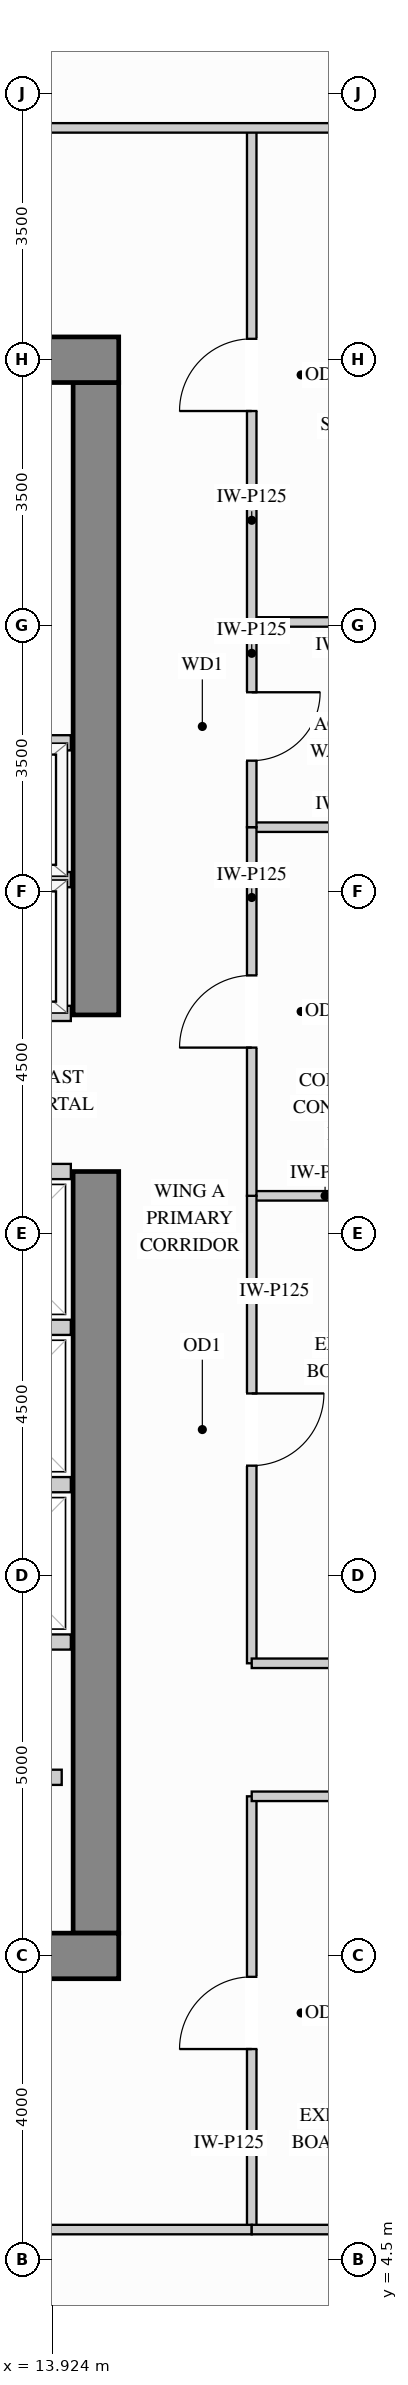
"""IFC4 building model, lengths in metres.
Left out: names, types, materials, properties, quantities, classifications, styles, units other than length and angle.
Written with IfcOpenShell. Run it as: python <this file> out.ifc"""

import sys

from ifc_helpers import new_model, si_unit, direction, frame, frame_2d, origin, place, context, subcontext, project, spatial, rectangle, extrude, source, transform, mapped, element, fill, save


model = new_model("IFC4")
c1 = context("Model", 3, precision=1e-05, world=origin(), true_north=direction((0.0, 1.0)))
c2 = subcontext(c1, "Body", "Model", "MODEL_VIEW")
j1 = project(units=[si_unit("LENGTHUNIT", "METRE"), si_unit("PLANEANGLEUNIT", "RADIAN")], contexts=[c1])
p1 = place(None, origin())
s1 = spatial("IfcSite", under=j1, at=p1, CompositionType="ELEMENT")
p2 = place(p1, origin())
s2 = spatial("IfcBuilding", under=s1, at=p2, CompositionType="ELEMENT")
p3 = place(p2, frame((0.0, 0.0, 179.1)))
s3 = spatial("IfcBuildingStorey", under=s2, at=p3, CompositionType="ELEMENT", Elevation=179.1)
m1 = source(origin(), c2, "Body", "SweptSolid", [
    extrude(rectangle(XDim=10.02, YDim=0.6, at=frame_2d((5.01, 0.0))), origin(), (0.0, 0.0, 1.0), 3.4),
])
p4 = place(p3, frame((14.5, 8.8, 0.0), z_axis=(0.0, 0.0, 1.0), x_axis=(0.0, 1.0, 0.0)))
e1 = element("IfcWall", 1, at=p4, inside=s3, PredefinedType="SHEAR", context=c2, shape_type="MappedRepresentation", body=[
    mapped(m1, transform((0.0, 0.0, 0.0), x_axis=(1.0, 0.0, 0.0), y_axis=(0.0, 1.0, 0.0), z_axis=(0.0, 0.0, 1.0))),
])
m2 = source(origin(), c2, "Body", "SweptSolid", [
    extrude(rectangle(XDim=8.32, YDim=0.6, at=frame_2d((4.16, 0.0))), origin(), (0.0, 0.0, 1.0), 3.4),
])
p5 = place(p3, frame((14.5, 20.88, 0.0), z_axis=(0.0, 0.0, 1.0), x_axis=(0.0, 1.0, 0.0)))
e2 = element("IfcWall", 2, at=p5, inside=s3, PredefinedType="SHEAR", context=c2, shape_type="MappedRepresentation", body=[
    mapped(m2, transform((0.0, 0.0, 0.0), x_axis=(1.0, 0.0, 0.0), y_axis=(0.0, 1.0, 0.0), z_axis=(0.0, 0.0, 1.0))),
])
m3 = source(origin(), c2, "Body", "SweptSolid", [
    extrude(rectangle(XDim=10.6, YDim=0.6, at=frame_2d((5.3, 0.0))), origin(), (0.0, 0.0, 1.0), 3.4),
])
for number, where, z_axis, x_axis in (
    (3, (4.2, 29.5, 0.0), (0.0, 0.0, 1.0), (1.0, 0.0, 0.0)),
    (4, (4.2, 8.5, 0.0), (0.0, 0.0, 1.0), (1.0, 0.0, 0.0)),
):
    element("IfcWall", number, at=place(p3, frame(where, z_axis=z_axis, x_axis=x_axis)), inside=s3, PredefinedType="SHEAR", context=c2, shape_type="MappedRepresentation", body=[
        mapped(m3, transform((0.0, 0.0, 0.0), x_axis=(1.0, 0.0, 0.0), y_axis=(0.0, 1.0, 0.0), z_axis=(0.0, 0.0, 1.0))),
    ])
m4 = source(origin(), c2, "Body", "SweptSolid", [
    extrude(rectangle(XDim=1.93, YDim=0.125, at=frame_2d((0.965, 0.0))), origin(), (0.0, 0.0, 1.0), 3.385),
])
p6 = place(p3, frame((16.55, 18.5, 0.0), z_axis=(0.0, 0.0, 1.0), x_axis=(1.0, 0.0, 0.0)))
e5 = element("IfcWall", 5, at=p6, inside=s3, PredefinedType="PARTITIONING", context=c2, shape_type="MappedRepresentation", body=[
    mapped(m4, transform((0.0, 0.0, 0.0), x_axis=(1.0, 0.0, 0.0), y_axis=(0.0, 1.0, 0.0), z_axis=(0.0, 0.0, 1.0))),
])
m5 = source(origin(), c2, "Body", "SweptSolid", [
    extrude(rectangle(XDim=2.598, YDim=0.125, at=frame_2d((1.299, 0.0))), origin(), (0.0, 0.0, 1.0), 3.385),
])
for number, where, z_axis, x_axis in (
    (6, (16.55, 23.35, 0.0), (0.0, 0.0, 1.0), (1.0, 0.0, 0.0)),
    (7, (16.55, 26.05, 0.0), (0.0, 0.0, 1.0), (1.0, 0.0, 0.0)),
):
    element("IfcWall", number, at=place(p3, frame(where, z_axis=z_axis, x_axis=x_axis)), inside=s3, PredefinedType="PARTITIONING", context=c2, shape_type="MappedRepresentation", body=[
        mapped(m5, transform((0.0, 0.0, 0.0), x_axis=(1.0, 0.0, 0.0), y_axis=(0.0, 1.0, 0.0), z_axis=(0.0, 0.0, 1.0))),
    ])
p7 = place(p3, frame((16.55, 12.35, 0.0), z_axis=(0.0, 0.0, 1.0), x_axis=(0.0, 1.0, 0.0)))
e8 = element("IfcWall", 8, at=p7, inside=s3, PredefinedType="PARTITIONING", context=c2, shape_type="SweptSolid", body=[
    extrude(rectangle(XDim=6.15, YDim=0.125, at=frame_2d((3.075, 0.0))), origin(), (0.0, 0.0, 1.0), 3.385),
])
p8 = place(p7, frame((2.6, 0.0, 0.0)))
e9 = element("IfcOpeningElement", 9, at=p8, cuts=e8, PredefinedType="OPENING", context=c2, shape_type="SweptSolid", body=[
    extrude(rectangle(XDim=0.95, YDim=2.15, at=frame_2d((0.475, 1.075))), frame((0.0, 0.073, 0.0), z_axis=(0.0, -1.0, 0.0), x_axis=(1.0, 0.0, 0.0)), (0.0, 0.0, 1.0), 0.145),
])
p9 = place(p3, frame((16.55, 18.5, 0.0), z_axis=(0.0, 0.0, 1.0), x_axis=(0.0, 1.0, 0.0)))
e10 = element("IfcWall", 10, at=p9, inside=s3, PredefinedType="PARTITIONING", context=c2, shape_type="SweptSolid", body=[
    extrude(rectangle(XDim=4.85, YDim=0.125, at=frame_2d((2.425, 0.0))), origin(), (0.0, 0.0, 1.0), 3.385),
])
p10 = place(p9, frame((1.95, 0.0, 0.0)))
e11 = element("IfcOpeningElement", 11, at=p10, cuts=e10, PredefinedType="OPENING", context=c2, shape_type="SweptSolid", body=[
    extrude(rectangle(XDim=0.95, YDim=2.15, at=frame_2d((0.475, 1.075))), frame((0.0, 0.073, 0.0), z_axis=(0.0, -1.0, 0.0), x_axis=(1.0, 0.0, 0.0)), (0.0, 0.0, 1.0), 0.145),
])
p11 = place(p3, frame((16.55, 26.05, 0.0), z_axis=(0.0, 0.0, 1.0), x_axis=(0.0, 1.0, 0.0)))
e12 = element("IfcWall", 12, at=p11, inside=s3, PredefinedType="PARTITIONING", context=c2, shape_type="SweptSolid", body=[
    extrude(rectangle(XDim=6.5, YDim=0.125, at=frame_2d((3.25, 0.0))), origin(), (0.0, 0.0, 1.0), 3.385),
])
p12 = place(p11, frame((2.775, 0.0, 0.0)))
e13 = element("IfcOpeningElement", 13, at=p12, cuts=e12, PredefinedType="OPENING", context=c2, shape_type="SweptSolid", body=[
    extrude(rectangle(XDim=0.95, YDim=2.15, at=frame_2d((0.475, 1.075))), frame((0.0, 0.073, 0.0), z_axis=(0.0, -1.0, 0.0), x_axis=(1.0, 0.0, 0.0)), (0.0, 0.0, 1.0), 0.145),
])
p13 = place(p3, frame((16.55, 4.9, 0.0), z_axis=(0.0, 0.0, 1.0), x_axis=(0.0, 1.0, 0.0)))
e14 = element("IfcWall", 14, at=p13, inside=s3, PredefinedType="PARTITIONING", context=c2, shape_type="SweptSolid", body=[
    extrude(rectangle(XDim=5.7, YDim=0.125, at=frame_2d((2.85, 0.0))), origin(), (0.0, 0.0, 1.0), 3.385),
])
p14 = place(p13, frame((2.375, 0.0, 0.0)))
e15 = element("IfcOpeningElement", 15, at=p14, cuts=e14, PredefinedType="OPENING", context=c2, shape_type="SweptSolid", body=[
    extrude(rectangle(XDim=0.95, YDim=2.15, at=frame_2d((0.475, 1.075))), frame((0.0, 0.073, 0.0), z_axis=(0.0, -1.0, 0.0), x_axis=(1.0, 0.0, 0.0)), (0.0, 0.0, 1.0), 0.145),
])
p15 = place(p3, frame((16.55, 23.35, 0.0), z_axis=(0.0, 0.0, 1.0), x_axis=(0.0, 1.0, 0.0)))
e16 = element("IfcWall", 16, at=p15, inside=s3, PredefinedType="PARTITIONING", context=c2, shape_type="SweptSolid", body=[
    extrude(rectangle(XDim=2.7, YDim=0.125, at=frame_2d((1.35, 0.0))), origin(), (0.0, 0.0, 1.0), 3.385),
])
p16 = place(p15, frame((0.875, 0.0, 0.0)))
e17 = element("IfcOpeningElement", 17, at=p16, cuts=e16, PredefinedType="OPENING", context=c2, shape_type="SweptSolid", body=[
    extrude(rectangle(XDim=0.9, YDim=2.15, at=frame_2d((0.45, 1.075))), frame((0.0, 0.073, 0.0), z_axis=(0.0, -1.0, 0.0), x_axis=(1.0, 0.0, 0.0)), (0.0, 0.0, 1.0), 0.145),
])
m6 = source(origin(), c2, "Body", "SweptSolid", [
    extrude(rectangle(XDim=7.498, YDim=0.125, at=frame_2d((3.749, 0.0))), origin(), (0.0, 0.0, 1.0), 3.385),
])
p17 = place(p3, frame((11.65, 32.55, 0.0), z_axis=(0.0, 0.0, 1.0), x_axis=(1.0, 0.0, 0.0)))
e18 = element("IfcWall", 18, at=p17, inside=s3, PredefinedType="PARTITIONING", context=c2, shape_type="MappedRepresentation", body=[
    mapped(m6, transform((0.0, 0.0, 0.0), x_axis=(1.0, 0.0, 0.0), y_axis=(0.0, 1.0, 0.0), z_axis=(0.0, 0.0, 1.0))),
])
m7 = source(origin(), c2, "Body", "SweptSolid", [
    extrude(rectangle(XDim=2.95, YDim=0.125, at=frame_2d((1.475, 0.0))), origin(), (0.0, 0.0, 1.0), 3.385),
])
for number, where, z_axis, x_axis in (
    (19, (16.55, 12.35, 0.0), (0.0, 0.0, 1.0), (1.0, 0.0, 0.0)),
    (20, (16.55, 10.6, 0.0), (0.0, 0.0, 1.0), (1.0, 0.0, 0.0)),
):
    element("IfcWall", number, at=place(p3, frame(where, z_axis=z_axis, x_axis=x_axis)), inside=s3, PredefinedType="PARTITIONING", context=c2, shape_type="MappedRepresentation", body=[
        mapped(m7, transform((0.0, 0.0, 0.0), x_axis=(1.0, 0.0, 0.0), y_axis=(0.0, 1.0, 0.0), z_axis=(0.0, 0.0, 1.0))),
    ])
p18 = place(p3, frame((10.213, 4.9, 0.0), z_axis=(0.0, 0.0, 1.0), x_axis=(1.0, 0.0, 0.0)))
e21 = element("IfcWall", 21, at=p18, inside=s3, PredefinedType="PARTITIONING", context=c2, shape_type="SweptSolid", body=[
    extrude(rectangle(XDim=6.337, YDim=0.125, at=frame_2d((3.168, 0.0))), origin(), (0.0, 0.0, 1.0), 2.848),
])
p19 = place(p18, frame((2.694, 0.0, 0.0)))
e22 = element("IfcOpeningElement", 22, at=p19, cuts=e21, PredefinedType="OPENING", context=c2, shape_type="SweptSolid", body=[
    extrude(rectangle(XDim=0.95, YDim=2.15, at=frame_2d((0.475, 1.075))), frame((0.0, 0.073, 0.0), z_axis=(0.0, -1.0, 0.0), x_axis=(1.0, 0.0, 0.0)), (0.0, 0.0, 1.0), 0.145),
])
m8 = source(origin(), c2, "Body", "SweptSolid", [
    extrude(rectangle(XDim=2.598, YDim=0.125, at=frame_2d((1.299, 0.0))), origin(), (0.0, 0.0, 1.0), 2.848),
])
p20 = place(p3, frame((16.55, 4.9, 0.0), z_axis=(0.0, 0.0, 1.0), x_axis=(1.0, 0.0, 0.0)))
e23 = element("IfcWall", 23, at=p20, inside=s3, PredefinedType="PARTITIONING", context=c2, shape_type="MappedRepresentation", body=[
    mapped(m8, transform((0.0, 0.0, 0.0), x_axis=(1.0, 0.0, 0.0), y_axis=(0.0, 1.0, 0.0), z_axis=(0.0, 0.0, 1.0))),
])
m9 = source(origin(), c2, "Body", "SweptSolid", [
    extrude(rectangle(XDim=1.63, YDim=0.2, at=frame_2d((0.815, 0.0))), origin(), (0.0, 0.0, 1.0), 3.385),
])
p21 = place(p3, frame((12.42, 10.85, 0.0), z_axis=(0.0, 0.0, 1.0), x_axis=(1.0, 0.0, 0.0)))
e24 = element("IfcWall", 24, at=p21, inside=s3, PredefinedType="PARTITIONING", context=c2, shape_type="MappedRepresentation", body=[
    mapped(m9, transform((0.0, 0.0, 0.0), x_axis=(1.0, 0.0, 0.0), y_axis=(0.0, 1.0, 0.0), z_axis=(0.0, 0.0, 1.0))),
])
m10 = source(origin(), c2, "Body", "SweptSolid", [
    extrude(rectangle(XDim=2.34, YDim=0.2, at=frame_2d((1.17, 0.0))), origin(), (0.0, 0.0, 1.0), 3.385),
])
for number, where, z_axis, x_axis in (
    (25, (11.83, 22.66, 0.0), (0.0, 0.0, 1.0), (1.0, 0.0, 0.0)),
    (26, (11.83, 20.9, 0.0), (0.0, 0.0, 1.0), (1.0, 0.0, 0.0)),
    (27, (11.83, 24.46, 0.0), (0.0, 0.0, 1.0), (1.0, 0.0, 0.0)),
):
    element("IfcWall", number, at=place(p3, frame(where, z_axis=z_axis, x_axis=x_axis)), inside=s3, PredefinedType="PARTITIONING", context=c2, shape_type="MappedRepresentation", body=[
        mapped(m10, transform((0.0, 0.0, 0.0), x_axis=(1.0, 0.0, 0.0), y_axis=(0.0, 1.0, 0.0), z_axis=(0.0, 0.0, 1.0))),
    ])
m11 = source(origin(), c2, "Body", "SweptSolid", [
    extrude(rectangle(XDim=1.94, YDim=0.2, at=frame_2d((0.97, 0.0))), origin(), (0.0, 0.0, 1.0), 3.385),
])
for number, where, z_axis, x_axis in (
    (28, (12.23, 14.7, 0.0), (0.0, 0.0, 1.0), (1.0, 0.0, 0.0)),
    (29, (12.23, 12.63, 0.0), (0.0, 0.0, 1.0), (1.0, 0.0, 0.0)),
    (30, (12.23, 16.77, 0.0), (0.0, 0.0, 1.0), (1.0, 0.0, 0.0)),
    (31, (12.23, 18.82, 0.0), (0.0, 0.0, 1.0), (1.0, 0.0, 0.0)),
):
    element("IfcWall", number, at=place(p3, frame(where, z_axis=z_axis, x_axis=x_axis)), inside=s3, PredefinedType="PARTITIONING", context=c2, shape_type="MappedRepresentation", body=[
        mapped(m11, transform((0.0, 0.0, 0.0), x_axis=(1.0, 0.0, 0.0), y_axis=(0.0, 1.0, 0.0), z_axis=(0.0, 0.0, 1.0))),
    ])
m12 = source(origin(), c2, "Body", "SweptSolid", [
    extrude(rectangle(XDim=0.95, YDim=2.15, at=frame_2d((0.475, 1.075))), frame((0.0, 0.025, 0.0), z_axis=(0.0, -1.0, 0.0), x_axis=(1.0, 0.0, 0.0)), (0.0, 0.0, 1.0), 0.05),
])
p22 = place(p14, origin())
e32 = element("IfcDoor", 32, at=p22, inside=s3, OperationType="SINGLE_SWING_LEFT", PredefinedType="DOOR", context=c2, shape_type="MappedRepresentation", body=[
    mapped(m12, transform((0.0, 0.0, 0.0), x_axis=(1.0, 0.0, 0.0), y_axis=(0.0, 1.0, 0.0), z_axis=(0.0, 0.0, 1.0))),
])
fill(e15, e32)
p23 = place(p8, origin())
e33 = element("IfcDoor", 33, at=p23, inside=s3, OperationType="SINGLE_SWING_RIGHT", PredefinedType="DOOR", context=c2, shape_type="MappedRepresentation", body=[
    mapped(m12, transform((0.0, 0.0, 0.0), x_axis=(1.0, 0.0, 0.0), y_axis=(0.0, 1.0, 0.0), z_axis=(0.0, 0.0, 1.0))),
])
fill(e9, e33)
p24 = place(p10, origin())
e34 = element("IfcDoor", 34, at=p24, inside=s3, OperationType="SINGLE_SWING_LEFT", PredefinedType="DOOR", context=c2, shape_type="MappedRepresentation", body=[
    mapped(m12, transform((0.0, 0.0, 0.0), x_axis=(1.0, 0.0, 0.0), y_axis=(0.0, 1.0, 0.0), z_axis=(0.0, 0.0, 1.0))),
])
fill(e11, e34)
p25 = place(p12, origin())
e35 = element("IfcDoor", 35, at=p25, inside=s3, OperationType="SINGLE_SWING_LEFT", PredefinedType="DOOR", context=c2, shape_type="MappedRepresentation", body=[
    mapped(m12, transform((0.0, 0.0, 0.0), x_axis=(1.0, 0.0, 0.0), y_axis=(0.0, 1.0, 0.0), z_axis=(0.0, 0.0, 1.0))),
])
fill(e13, e35)
m13 = source(origin(), c2, "Body", "SweptSolid", [
    extrude(rectangle(XDim=0.9, YDim=2.15, at=frame_2d((0.45, 1.075))), frame((0.0, 0.025, 0.0), z_axis=(0.0, -1.0, 0.0), x_axis=(1.0, 0.0, 0.0)), (0.0, 0.0, 1.0), 0.05),
])
p26 = place(p16, origin())
e36 = element("IfcDoor", 36, at=p26, inside=s3, OperationType="SINGLE_SWING_RIGHT", PredefinedType="DOOR", context=c2, shape_type="MappedRepresentation", body=[
    mapped(m13, transform((0.0, 0.0, 0.0), x_axis=(1.0, 0.0, 0.0), y_axis=(0.0, 1.0, 0.0), z_axis=(0.0, 0.0, 1.0))),
])
fill(e17, e36)
save(model, sys.argv[1])
